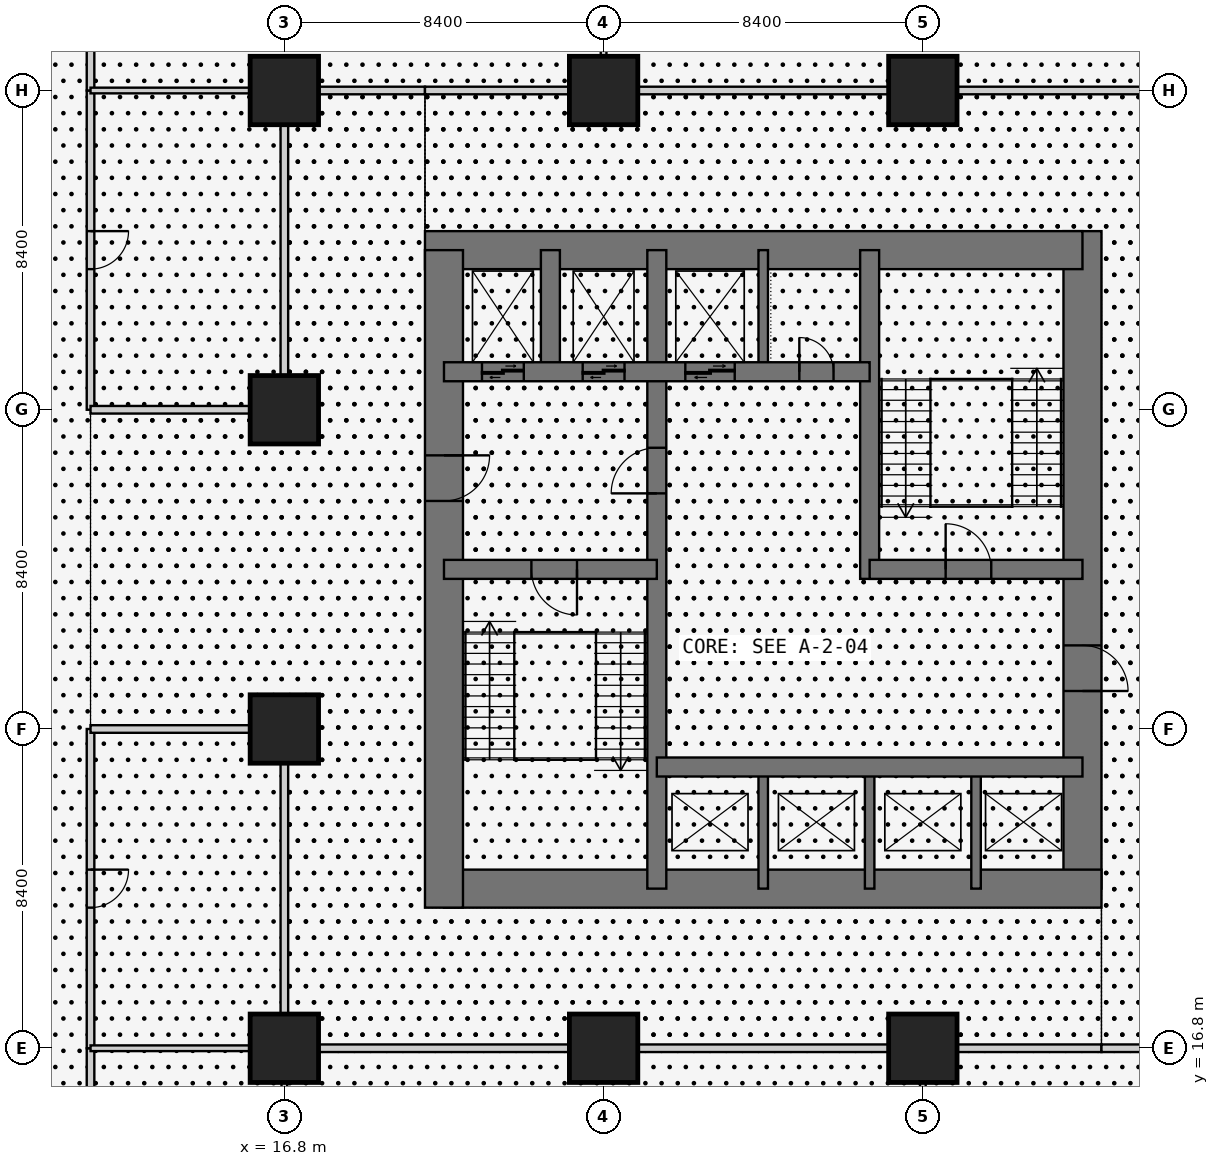
"""IFC4 building model, lengths in metres.
Left out: names, types, materials, properties, quantities, classifications, styles, units other than length and angle.
Written with IfcOpenShell. Run it as: python <this file> out.ifc"""

import sys

from ifc_helpers import new_model, si_unit, direction, frame, frame_2d, origin, origin_2d, place, context, subcontext, project, spatial, rectangle, extrude, element, fill, save


model = new_model("IFC4")
c1 = context("Model", 3, precision=1e-05, world=origin(), true_north=direction((0.0, 1.0)))
c2 = subcontext(c1, "Body", "Model", "MODEL_VIEW")
j1 = project(units=[si_unit("LENGTHUNIT", "METRE"), si_unit("PLANEANGLEUNIT", "RADIAN")], contexts=[c1])
p1 = place(None, origin())
s1 = spatial("IfcSite", under=j1, at=p1, CompositionType="ELEMENT")
p2 = place(p1, origin())
s2 = spatial("IfcBuilding", under=s1, at=p2, CompositionType="ELEMENT")
p3 = place(p2, frame((0.0, 0.0, 6.0)))
s3 = spatial("IfcBuildingStorey", under=s2, at=p3, CompositionType="ELEMENT", Elevation=6.0)
for number, where, z_axis, x_axis in (
    (1, (16.8, 16.8, 0.0), (0.0, 0.0, 1.0), (1.0, 0.0, 0.0)),
    (2, (16.8, 25.2, 0.0), (0.0, 0.0, 1.0), (1.0, 0.0, 0.0)),
    (3, (16.8, 33.6, 0.0), (0.0, 0.0, 1.0), (1.0, 0.0, 0.0)),
    (4, (16.8, 42.0, 0.0), (0.0, 0.0, 1.0), (1.0, 0.0, 0.0)),
    (5, (25.2, 16.8, 0.0), (0.0, 0.0, 1.0), (1.0, 0.0, 0.0)),
    (6, (25.2, 42.0, 0.0), (0.0, 0.0, 1.0), (1.0, 0.0, 0.0)),
    (7, (33.6, 16.8, 0.0), (0.0, 0.0, 1.0), (1.0, 0.0, 0.0)),
    (8, (33.6, 42.0, 0.0), (0.0, 0.0, 1.0), (1.0, 0.0, 0.0)),
):
    element("IfcColumn", number, at=place(p3, frame(where, z_axis=z_axis, x_axis=x_axis)), inside=s3, PredefinedType="COLUMN", context=c2, shape_type="SweptSolid", body=[
        extrude(rectangle(XDim=1.8, YDim=1.8, at=origin_2d()), origin(), (0.0, 0.0, 1.0), 4.5),
    ])
p4 = place(p3, frame((21.0, 21.0, 0.0), z_axis=(0.0, 0.0, 1.0), x_axis=(1.0, 0.0, 0.0)))
e9 = element("IfcWall", 9, at=p4, inside=s3, PredefinedType="SHEAR", context=c2, shape_type="SweptSolid", body=[
    extrude(rectangle(XDim=17.3, YDim=1.0, at=frame_2d((8.65, 0.0))), origin(), (0.0, 0.0, 1.0), 4.5),
])
p5 = place(p3, frame((37.8, 21.0, 0.0), z_axis=(0.0, 0.0, 1.0), x_axis=(0.0, 1.0, 0.0)))
e10 = element("IfcWall", 10, at=p5, inside=s3, PredefinedType="SHEAR", context=c2, shape_type="SweptSolid", body=[
    extrude(rectangle(XDim=17.3, YDim=1.0, at=frame_2d((8.65, 0.0))), origin(), (0.0, 0.0, 1.0), 4.5),
])
p6 = place(p5, frame((5.2, 0.0, 0.0)))
e11 = element("IfcOpeningElement", 11, at=p6, cuts=e10, PredefinedType="OPENING", context=c2, shape_type="SweptSolid", body=[
    extrude(rectangle(XDim=1.2, YDim=2.1, at=frame_2d((0.6, 1.05))), frame((0.0, 0.51, 0.0), z_axis=(0.0, -1.0, 0.0), x_axis=(1.0, 0.0, 0.0)), (0.0, 0.0, 1.0), 1.02),
])
p7 = place(p3, frame((37.8, 37.8, 0.0), z_axis=(0.0, 0.0, 1.0), x_axis=(-1.0, 0.0, 0.0)))
e12 = element("IfcWall", 12, at=p7, inside=s3, PredefinedType="SHEAR", context=c2, shape_type="SweptSolid", body=[
    extrude(rectangle(XDim=17.3, YDim=1.0, at=frame_2d((8.65, 0.0))), origin(), (0.0, 0.0, 1.0), 4.5),
])
p8 = place(p3, frame((21.0, 37.8, 0.0), z_axis=(0.0, 0.0, 1.0), x_axis=(0.0, -1.0, 0.0)))
e13 = element("IfcWall", 13, at=p8, inside=s3, PredefinedType="SHEAR", context=c2, shape_type="SweptSolid", body=[
    extrude(rectangle(XDim=17.3, YDim=1.0, at=frame_2d((8.65, 0.0))), origin(), (0.0, 0.0, 1.0), 4.5),
])
p9 = place(p8, frame((5.4, 0.0, 0.0)))
e14 = element("IfcOpeningElement", 14, at=p9, cuts=e13, PredefinedType="OPENING", context=c2, shape_type="SweptSolid", body=[
    extrude(rectangle(XDim=1.2, YDim=2.1, at=frame_2d((0.6, 1.05))), frame((0.0, 0.51, 0.0), z_axis=(0.0, -1.0, 0.0), x_axis=(1.0, 0.0, 0.0)), (0.0, 0.0, 1.0), 1.02),
])
p10 = place(p3, frame((26.6, 21.0, 0.0), z_axis=(0.0, 0.0, 1.0), x_axis=(0.0, 1.0, 0.0)))
e15 = element("IfcWall", 15, at=p10, inside=s3, PredefinedType="SHEAR", context=c2, shape_type="SweptSolid", body=[
    extrude(rectangle(XDim=16.8, YDim=0.5, at=frame_2d((8.4, 0.0))), origin(), (0.0, 0.0, 1.0), 4.5),
])
p11 = place(p10, frame((10.4, 0.0, 0.0)))
e16 = element("IfcOpeningElement", 16, at=p11, cuts=e15, PredefinedType="OPENING", context=c2, shape_type="SweptSolid", body=[
    extrude(rectangle(XDim=1.2, YDim=2.1, at=frame_2d((0.6, 1.05))), frame((0.0, 0.26, 0.0), z_axis=(0.0, -1.0, 0.0), x_axis=(1.0, 0.0, 0.0)), (0.0, 0.0, 1.0), 0.52),
])
p12 = place(p3, frame((21.0, 29.4, 0.0), z_axis=(0.0, 0.0, 1.0), x_axis=(1.0, 0.0, 0.0)))
e17 = element("IfcWall", 17, at=p12, inside=s3, PredefinedType="SHEAR", context=c2, shape_type="SweptSolid", body=[
    extrude(rectangle(XDim=5.6, YDim=0.5, at=frame_2d((2.8, 0.0))), origin(), (0.0, 0.0, 1.0), 4.5),
])
p13 = place(p12, frame((2.3, 0.0, 0.0)))
e18 = element("IfcOpeningElement", 18, at=p13, cuts=e17, PredefinedType="OPENING", context=c2, shape_type="SweptSolid", body=[
    extrude(rectangle(XDim=1.2, YDim=2.1, at=frame_2d((0.6, 1.05))), frame((0.0, 0.26, 0.0), z_axis=(0.0, -1.0, 0.0), x_axis=(1.0, 0.0, 0.0)), (0.0, 0.0, 1.0), 0.52),
])
p14 = place(p3, frame((21.0, 34.6, 0.0), z_axis=(0.0, 0.0, 1.0), x_axis=(1.0, 0.0, 0.0)))
e19 = element("IfcWall", 19, at=p14, inside=s3, PredefinedType="SHEAR", context=c2, shape_type="SweptSolid", body=[
    extrude(rectangle(XDim=11.2, YDim=0.5, at=frame_2d((5.6, 0.0))), origin(), (0.0, 0.0, 1.0), 4.5),
])
p15 = place(p14, frame((9.35, 0.0, 0.0)))
e20 = element("IfcOpeningElement", 20, at=p15, cuts=e19, PredefinedType="OPENING", context=c2, shape_type="SweptSolid", body=[
    extrude(rectangle(XDim=0.9, YDim=2.1, at=frame_2d((0.45, 1.05))), frame((0.0, 0.26, 0.0), z_axis=(0.0, -1.0, 0.0), x_axis=(1.0, 0.0, 0.0)), (0.0, 0.0, 1.0), 0.52),
])
p16 = place(p14, frame((1.0, 0.0, 0.0)))
e21 = element("IfcOpeningElement", 21, at=p16, cuts=e19, PredefinedType="OPENING", context=c2, shape_type="SweptSolid", body=[
    extrude(rectangle(XDim=1.1, YDim=2.1, at=frame_2d((0.55, 1.05))), frame((0.0, 0.26, 0.0), z_axis=(0.0, -1.0, 0.0), x_axis=(1.0, 0.0, 0.0)), (0.0, 0.0, 1.0), 0.52),
])
p17 = place(p14, frame((3.65, 0.0, 0.0)))
e22 = element("IfcOpeningElement", 22, at=p17, cuts=e19, PredefinedType="OPENING", context=c2, shape_type="SweptSolid", body=[
    extrude(rectangle(XDim=1.1, YDim=2.1, at=frame_2d((0.55, 1.05))), frame((0.0, 0.26, 0.0), z_axis=(0.0, -1.0, 0.0), x_axis=(1.0, 0.0, 0.0)), (0.0, 0.0, 1.0), 0.52),
])
p18 = place(p14, frame((6.35, 0.0, 0.0)))
e23 = element("IfcOpeningElement", 23, at=p18, cuts=e19, PredefinedType="OPENING", context=c2, shape_type="SweptSolid", body=[
    extrude(rectangle(XDim=1.3, YDim=2.1, at=frame_2d((0.65, 1.05))), frame((0.0, 0.26, 0.0), z_axis=(0.0, -1.0, 0.0), x_axis=(1.0, 0.0, 0.0)), (0.0, 0.0, 1.0), 0.52),
])
p19 = place(p3, frame((23.8, 34.6, 0.0), z_axis=(0.0, 0.0, 1.0), x_axis=(0.0, 1.0, 0.0)))
e24 = element("IfcWall", 24, at=p19, inside=s3, PredefinedType="SHEAR", context=c2, shape_type="SweptSolid", body=[
    extrude(rectangle(XDim=3.2, YDim=0.5, at=frame_2d((1.6, 0.0))), origin(), (0.0, 0.0, 1.0), 4.5),
])
p20 = place(p3, frame((26.6, 24.2, 0.0), z_axis=(0.0, 0.0, 1.0), x_axis=(1.0, 0.0, 0.0)))
e25 = element("IfcWall", 25, at=p20, inside=s3, PredefinedType="SHEAR", context=c2, shape_type="SweptSolid", body=[
    extrude(rectangle(XDim=11.2, YDim=0.5, at=frame_2d((5.6, 0.0))), origin(), (0.0, 0.0, 1.0), 4.5),
])
p21 = place(p3, frame((32.2, 29.15, 0.0), z_axis=(0.0, 0.0, 1.0), x_axis=(0.0, 1.0, 0.0)))
e26 = element("IfcWall", 26, at=p21, inside=s3, PredefinedType="SHEAR", context=c2, shape_type="SweptSolid", body=[
    extrude(rectangle(XDim=8.65, YDim=0.5, at=frame_2d((4.325, 0.0))), origin(), (0.0, 0.0, 1.0), 4.5),
])
p22 = place(p3, frame((32.2, 29.4, 0.0), z_axis=(0.0, 0.0, 1.0), x_axis=(1.0, 0.0, 0.0)))
e27 = element("IfcWall", 27, at=p22, inside=s3, PredefinedType="SHEAR", context=c2, shape_type="SweptSolid", body=[
    extrude(rectangle(XDim=5.6, YDim=0.5, at=frame_2d((2.8, 0.0))), origin(), (0.0, 0.0, 1.0), 4.5),
])
p23 = place(p22, frame((2.0, 0.0, 0.0)))
e28 = element("IfcOpeningElement", 28, at=p23, cuts=e27, PredefinedType="OPENING", context=c2, shape_type="SweptSolid", body=[
    extrude(rectangle(XDim=1.2, YDim=2.1, at=frame_2d((0.6, 1.05))), frame((0.0, 0.26, 0.0), z_axis=(0.0, -1.0, 0.0), x_axis=(1.0, 0.0, 0.0)), (0.0, 0.0, 1.0), 0.52),
])
for number, where, z_axis, x_axis in (
    (29, (29.4, 21.0, 0.0), (0.0, 0.0, 1.0), (0.0, 1.0, 0.0)),
    (30, (32.2, 21.0, 0.0), (0.0, 0.0, 1.0), (0.0, 1.0, 0.0)),
    (31, (35.0, 21.0, 0.0), (0.0, 0.0, 1.0), (0.0, 1.0, 0.0)),
    (32, (29.4, 34.6, 0.0), (0.0, 0.0, 1.0), (0.0, 1.0, 0.0)),
):
    element("IfcWall", number, at=place(p3, frame(where, z_axis=z_axis, x_axis=x_axis)), inside=s3, PredefinedType="SHEAR", context=c2, shape_type="SweptSolid", body=[
        extrude(rectangle(XDim=3.2, YDim=0.25, at=frame_2d((1.6, 0.0))), origin(), (0.0, 0.0, 1.0), 4.5),
    ])
p24 = place(p3, frame((11.7, 16.8, 0.0), z_axis=(0.0, 0.0, 1.0), x_axis=(0.0, -1.0, 0.0)))
e33 = element("IfcWall", 33, at=p24, inside=s3, PredefinedType="PARTITIONING", context=c2, shape_type="SweptSolid", body=[
    extrude(rectangle(XDim=8.4, YDim=0.2, at=frame_2d((4.2, 0.0))), origin(), (0.0, 0.0, 1.0), 4.3),
])
p25 = place(p24, frame((3.7, 0.0, 0.0)))
e34 = element("IfcOpeningElement", 34, at=p25, cuts=e33, PredefinedType="OPENING", context=c2, shape_type="SweptSolid", body=[
    extrude(rectangle(XDim=1.0, YDim=2.1, at=frame_2d((0.5, 1.05))), frame((0.0, 0.11, 0.0), z_axis=(0.0, -1.0, 0.0), x_axis=(1.0, 0.0, 0.0)), (0.0, 0.0, 1.0), 0.22),
])
p26 = place(p3, frame((11.7, 25.2, 0.0), z_axis=(0.0, 0.0, 1.0), x_axis=(0.0, -1.0, 0.0)))
e35 = element("IfcWall", 35, at=p26, inside=s3, PredefinedType="PARTITIONING", context=c2, shape_type="SweptSolid", body=[
    extrude(rectangle(XDim=8.4, YDim=0.2, at=frame_2d((4.2, 0.0))), origin(), (0.0, 0.0, 1.0), 4.3),
])
p27 = place(p26, frame((3.7, 0.0, 0.0)))
e36 = element("IfcOpeningElement", 36, at=p27, cuts=e35, PredefinedType="OPENING", context=c2, shape_type="SweptSolid", body=[
    extrude(rectangle(XDim=1.0, YDim=2.1, at=frame_2d((0.5, 1.05))), frame((0.0, 0.11, 0.0), z_axis=(0.0, -1.0, 0.0), x_axis=(1.0, 0.0, 0.0)), (0.0, 0.0, 1.0), 0.22),
])
p28 = place(p3, frame((11.7, 42.0, 0.0), z_axis=(0.0, 0.0, 1.0), x_axis=(0.0, -1.0, 0.0)))
e37 = element("IfcWall", 37, at=p28, inside=s3, PredefinedType="PARTITIONING", context=c2, shape_type="SweptSolid", body=[
    extrude(rectangle(XDim=8.4, YDim=0.2, at=frame_2d((4.2, 0.0))), origin(), (0.0, 0.0, 1.0), 4.3),
])
p29 = place(p28, frame((3.7, 0.0, 0.0)))
e38 = element("IfcOpeningElement", 38, at=p29, cuts=e37, PredefinedType="OPENING", context=c2, shape_type="SweptSolid", body=[
    extrude(rectangle(XDim=1.0, YDim=2.1, at=frame_2d((0.5, 1.05))), frame((0.0, 0.11, 0.0), z_axis=(0.0, -1.0, 0.0), x_axis=(1.0, 0.0, 0.0)), (0.0, 0.0, 1.0), 0.22),
])
p30 = place(p3, frame((11.7, 47.1, 0.0), z_axis=(0.0, 0.0, 1.0), x_axis=(0.0, -1.0, 0.0)))
e39 = element("IfcWall", 39, at=p30, inside=s3, PredefinedType="PARTITIONING", context=c2, shape_type="SweptSolid", body=[
    extrude(rectangle(XDim=5.1, YDim=0.2, at=frame_2d((2.55, 0.0))), origin(), (0.0, 0.0, 1.0), 4.3),
])
p31 = place(p3, frame((24.3, 16.8, 0.0), z_axis=(0.0, 0.0, 1.0), x_axis=(-1.0, 0.0, 0.0)))
e40 = element("IfcWall", 40, at=p31, inside=s3, PredefinedType="PARTITIONING", context=c2, shape_type="SweptSolid", body=[
    extrude(rectangle(XDim=6.6, YDim=0.2, at=frame_2d((3.3, 0.0))), origin(), (0.0, 0.0, 1.0), 3.543),
])
p32 = place(p3, frame((32.7, 16.8, 0.0), z_axis=(0.0, 0.0, 1.0), x_axis=(-1.0, 0.0, 0.0)))
e41 = element("IfcWall", 41, at=p32, inside=s3, PredefinedType="PARTITIONING", context=c2, shape_type="SweptSolid", body=[
    extrude(rectangle(XDim=6.6, YDim=0.2, at=frame_2d((3.3, 0.0))), origin(), (0.0, 0.0, 1.0), 3.543),
])
p33 = place(p3, frame((38.3, 16.8, 0.0), z_axis=(0.0, 0.0, 1.0), x_axis=(-1.0, 0.0, 0.0)))
e42 = element("IfcWall", 42, at=p33, inside=s3, PredefinedType="PARTITIONING", context=c2, shape_type="SweptSolid", body=[
    extrude(rectangle(XDim=3.8, YDim=0.2, at=frame_2d((1.9, 0.0))), origin(), (0.0, 0.0, 1.0), 3.543),
])
p34 = place(p3, frame((15.9, 25.2, 0.0), z_axis=(0.0, 0.0, 1.0), x_axis=(-1.0, 0.0, 0.0)))
e43 = element("IfcWall", 43, at=p34, inside=s3, PredefinedType="PARTITIONING", context=c2, shape_type="SweptSolid", body=[
    extrude(rectangle(XDim=4.2, YDim=0.2, at=frame_2d((2.1, 0.0))), origin(), (0.0, 0.0, 1.0), 3.543),
])
p35 = place(p3, frame((16.8, 17.7, 0.0), z_axis=(0.0, 0.0, 1.0), x_axis=(0.0, 1.0, 0.0)))
e44 = element("IfcWall", 44, at=p35, inside=s3, PredefinedType="PARTITIONING", context=c2, shape_type="SweptSolid", body=[
    extrude(rectangle(XDim=6.6, YDim=0.2, at=frame_2d((3.3, 0.0))), origin(), (0.0, 0.0, 1.0), 3.543),
])
p36 = place(p3, frame((11.7, 33.6, 0.0), z_axis=(0.0, 0.0, 1.0), x_axis=(1.0, 0.0, 0.0)))
e45 = element("IfcWall", 45, at=p36, inside=s3, PredefinedType="PARTITIONING", context=c2, shape_type="SweptSolid", body=[
    extrude(rectangle(XDim=4.2, YDim=0.2, at=frame_2d((2.1, 0.0))), origin(), (0.0, 0.0, 1.0), 3.543),
])
p37 = place(p3, frame((16.8, 34.5, 0.0), z_axis=(0.0, 0.0, 1.0), x_axis=(0.0, 1.0, 0.0)))
e46 = element("IfcWall", 46, at=p37, inside=s3, PredefinedType="PARTITIONING", context=c2, shape_type="SweptSolid", body=[
    extrude(rectangle(XDim=6.6, YDim=0.2, at=frame_2d((3.3, 0.0))), origin(), (0.0, 0.0, 1.0), 3.543),
])
for number, where, z_axis, x_axis in (
    (47, (17.7, 42.0, 0.0), (0.0, 0.0, 1.0), (1.0, 0.0, 0.0)),
    (48, (41.1, 16.8, 0.0), (0.0, 0.0, 1.0), (-1.0, 0.0, 0.0)),
):
    element("IfcWall", number, at=place(p3, frame(where, z_axis=z_axis, x_axis=x_axis)), inside=s3, PredefinedType="PARTITIONING", context=c2, shape_type="SweptSolid", body=[
        extrude(rectangle(XDim=2.8, YDim=0.2, at=frame_2d((1.4, 0.0))), origin(), (0.0, 0.0, 1.0), 3.543),
    ])
p38 = place(p3, frame((20.5, 42.0, 0.0), z_axis=(0.0, 0.0, 1.0), x_axis=(1.0, 0.0, 0.0)))
e49 = element("IfcWall", 49, at=p38, inside=s3, PredefinedType="PARTITIONING", context=c2, shape_type="SweptSolid", body=[
    extrude(rectangle(XDim=3.8, YDim=0.2, at=frame_2d((1.9, 0.0))), origin(), (0.0, 0.0, 1.0), 3.543),
])
p39 = place(p3, frame((26.1, 42.0, 0.0), z_axis=(0.0, 0.0, 1.0), x_axis=(1.0, 0.0, 0.0)))
e50 = element("IfcWall", 50, at=p39, inside=s3, PredefinedType="PARTITIONING", context=c2, shape_type="SweptSolid", body=[
    extrude(rectangle(XDim=6.6, YDim=0.2, at=frame_2d((3.3, 0.0))), origin(), (0.0, 0.0, 1.0), 3.543),
])
p40 = place(p3, frame((34.5, 42.0, 0.0), z_axis=(0.0, 0.0, 1.0), x_axis=(1.0, 0.0, 0.0)))
e51 = element("IfcWall", 51, at=p40, inside=s3, PredefinedType="PARTITIONING", context=c2, shape_type="SweptSolid", body=[
    extrude(rectangle(XDim=6.6, YDim=0.2, at=frame_2d((3.3, 0.0))), origin(), (0.0, 0.0, 1.0), 3.543),
])
p41 = place(p3, frame((16.8, 15.9, 0.0), z_axis=(0.0, 0.0, 1.0), x_axis=(0.0, -1.0, 0.0)))
e52 = element("IfcWall", 52, at=p41, inside=s3, PredefinedType="PARTITIONING", context=c2, shape_type="SweptSolid", body=[
    extrude(rectangle(XDim=6.6, YDim=0.15, at=frame_2d((3.3, 0.0))), origin(), (0.0, 0.0, 1.0), 3.543),
])
p42 = place(p3, frame((11.7, 16.8, 0.0), z_axis=(0.0, 0.0, 1.0), x_axis=(1.0, 0.0, 0.0)))
e53 = element("IfcWall", 53, at=p42, inside=s3, PredefinedType="PARTITIONING", context=c2, shape_type="SweptSolid", body=[
    extrude(rectangle(XDim=4.2, YDim=0.15, at=frame_2d((2.1, 0.0))), origin(), (0.0, 0.0, 1.0), 3.543),
])
p43 = place(p3, frame((33.6, 15.9, 0.0), z_axis=(0.0, 0.0, 1.0), x_axis=(0.0, -1.0, 0.0)))
e54 = element("IfcWall", 54, at=p43, inside=s3, PredefinedType="PARTITIONING", context=c2, shape_type="SweptSolid", body=[
    extrude(rectangle(XDim=6.6, YDim=0.15, at=frame_2d((3.3, 0.0))), origin(), (0.0, 0.0, 1.0), 3.543),
])
p44 = place(p3, frame((11.7, 42.0, 0.0), z_axis=(0.0, 0.0, 1.0), x_axis=(1.0, 0.0, 0.0)))
e55 = element("IfcWall", 55, at=p44, inside=s3, PredefinedType="PARTITIONING", context=c2, shape_type="SweptSolid", body=[
    extrude(rectangle(XDim=4.2, YDim=0.15, at=frame_2d((2.1, 0.0))), origin(), (0.0, 0.0, 1.0), 3.543),
])
p45 = place(p3, frame((25.2, 47.1, 0.0), z_axis=(0.0, 0.0, 1.0), x_axis=(0.0, -1.0, 0.0)))
e56 = element("IfcWall", 56, at=p45, inside=s3, PredefinedType="PARTITIONING", context=c2, shape_type="SweptSolid", body=[
    extrude(rectangle(XDim=4.2, YDim=0.15, at=frame_2d((2.1, 0.0))), origin(), (0.0, 0.0, 1.0), 3.543),
])
p46 = place(p27, origin())
e57 = element("IfcDoor", 57, at=p46, inside=s3, OperationType="SINGLE_SWING_LEFT", PredefinedType="DOOR", context=c2, shape_type="SweptSolid", body=[
    extrude(rectangle(XDim=1.0, YDim=2.1, at=frame_2d((0.5, 1.05))), frame((0.0, 0.025, 0.0), z_axis=(0.0, -1.0, 0.0), x_axis=(1.0, 0.0, 0.0)), (0.0, 0.0, 1.0), 0.05),
])
fill(e36, e57)
p47 = place(p29, origin())
e58 = element("IfcDoor", 58, at=p47, inside=s3, OperationType="SINGLE_SWING_LEFT", PredefinedType="DOOR", context=c2, shape_type="SweptSolid", body=[
    extrude(rectangle(XDim=1.0, YDim=2.1, at=frame_2d((0.5, 1.05))), frame((0.0, 0.025, 0.0), z_axis=(0.0, -1.0, 0.0), x_axis=(1.0, 0.0, 0.0)), (0.0, 0.0, 1.0), 0.05),
])
fill(e38, e58)
p48 = place(p9, origin())
e59 = element("IfcDoor", 59, at=p48, inside=s3, OperationType="SINGLE_SWING_LEFT", PredefinedType="DOOR", context=c2, shape_type="SweptSolid", body=[
    extrude(rectangle(XDim=1.2, YDim=2.1, at=frame_2d((0.6, 1.05))), frame((0.0, 0.025, 0.0), z_axis=(0.0, -1.0, 0.0), x_axis=(1.0, 0.0, 0.0)), (0.0, 0.0, 1.0), 0.05),
])
fill(e14, e59)
p49 = place(p13, frame((1.2, 0.0, 0.0), z_axis=(0.0, 0.0, 1.0), x_axis=(-1.0, 0.0, 0.0)))
e60 = element("IfcDoor", 60, at=p49, inside=s3, OperationType="SINGLE_SWING_LEFT", PredefinedType="DOOR", context=c2, shape_type="SweptSolid", body=[
    extrude(rectangle(XDim=1.2, YDim=2.1, at=frame_2d((0.6, 1.05))), frame((0.0, 0.025, 0.0), z_axis=(0.0, -1.0, 0.0), x_axis=(1.0, 0.0, 0.0)), (0.0, 0.0, 1.0), 0.05),
])
fill(e18, e60)
p50 = place(p11, origin())
e61 = element("IfcDoor", 61, at=p50, inside=s3, OperationType="SINGLE_SWING_LEFT", PredefinedType="DOOR", context=c2, shape_type="SweptSolid", body=[
    extrude(rectangle(XDim=1.2, YDim=2.1, at=frame_2d((0.6, 1.05))), frame((0.0, 0.025, 0.0), z_axis=(0.0, -1.0, 0.0), x_axis=(1.0, 0.0, 0.0)), (0.0, 0.0, 1.0), 0.05),
])
fill(e16, e61)
p51 = place(p6, frame((1.2, 0.0, 0.0), z_axis=(0.0, 0.0, 1.0), x_axis=(-1.0, 0.0, 0.0)))
e62 = element("IfcDoor", 62, at=p51, inside=s3, OperationType="SINGLE_SWING_RIGHT", PredefinedType="DOOR", context=c2, shape_type="SweptSolid", body=[
    extrude(rectangle(XDim=1.2, YDim=2.1, at=frame_2d((0.6, 1.05))), frame((0.0, 0.025, 0.0), z_axis=(0.0, -1.0, 0.0), x_axis=(1.0, 0.0, 0.0)), (0.0, 0.0, 1.0), 0.05),
])
fill(e11, e62)
p52 = place(p23, origin())
e63 = element("IfcDoor", 63, at=p52, inside=s3, OperationType="SINGLE_SWING_LEFT", PredefinedType="DOOR", context=c2, shape_type="SweptSolid", body=[
    extrude(rectangle(XDim=1.2, YDim=2.1, at=frame_2d((0.6, 1.05))), frame((0.0, 0.025, 0.0), z_axis=(0.0, -1.0, 0.0), x_axis=(1.0, 0.0, 0.0)), (0.0, 0.0, 1.0), 0.05),
])
fill(e28, e63)
p53 = place(p15, origin())
e64 = element("IfcDoor", 64, at=p53, inside=s3, OperationType="SINGLE_SWING_LEFT", PredefinedType="DOOR", context=c2, shape_type="SweptSolid", body=[
    extrude(rectangle(XDim=0.9, YDim=2.1, at=frame_2d((0.45, 1.05))), frame((0.0, 0.025, 0.0), z_axis=(0.0, -1.0, 0.0), x_axis=(1.0, 0.0, 0.0)), (0.0, 0.0, 1.0), 0.05),
])
fill(e20, e64)
p54 = place(p16, origin())
e65 = element("IfcDoor", 65, at=p54, inside=s3, OperationType="DOUBLE_DOOR_SLIDING", PredefinedType="DOOR", context=c2, shape_type="SweptSolid", body=[
    extrude(rectangle(XDim=1.1, YDim=2.1, at=frame_2d((0.55, 1.05))), frame((0.0, 0.025, 0.0), z_axis=(0.0, -1.0, 0.0), x_axis=(1.0, 0.0, 0.0)), (0.0, 0.0, 1.0), 0.05),
])
fill(e21, e65)
p55 = place(p17, origin())
e66 = element("IfcDoor", 66, at=p55, inside=s3, OperationType="DOUBLE_DOOR_SLIDING", PredefinedType="DOOR", context=c2, shape_type="SweptSolid", body=[
    extrude(rectangle(XDim=1.1, YDim=2.1, at=frame_2d((0.55, 1.05))), frame((0.0, 0.025, 0.0), z_axis=(0.0, -1.0, 0.0), x_axis=(1.0, 0.0, 0.0)), (0.0, 0.0, 1.0), 0.05),
])
fill(e22, e66)
p56 = place(p18, origin())
e67 = element("IfcDoor", 67, at=p56, inside=s3, OperationType="DOUBLE_DOOR_SLIDING", PredefinedType="DOOR", context=c2, shape_type="SweptSolid", body=[
    extrude(rectangle(XDim=1.3, YDim=2.1, at=frame_2d((0.65, 1.05))), frame((0.0, 0.025, 0.0), z_axis=(0.0, -1.0, 0.0), x_axis=(1.0, 0.0, 0.0)), (0.0, 0.0, 1.0), 0.05),
])
fill(e23, e67)
save(model, sys.argv[1])
